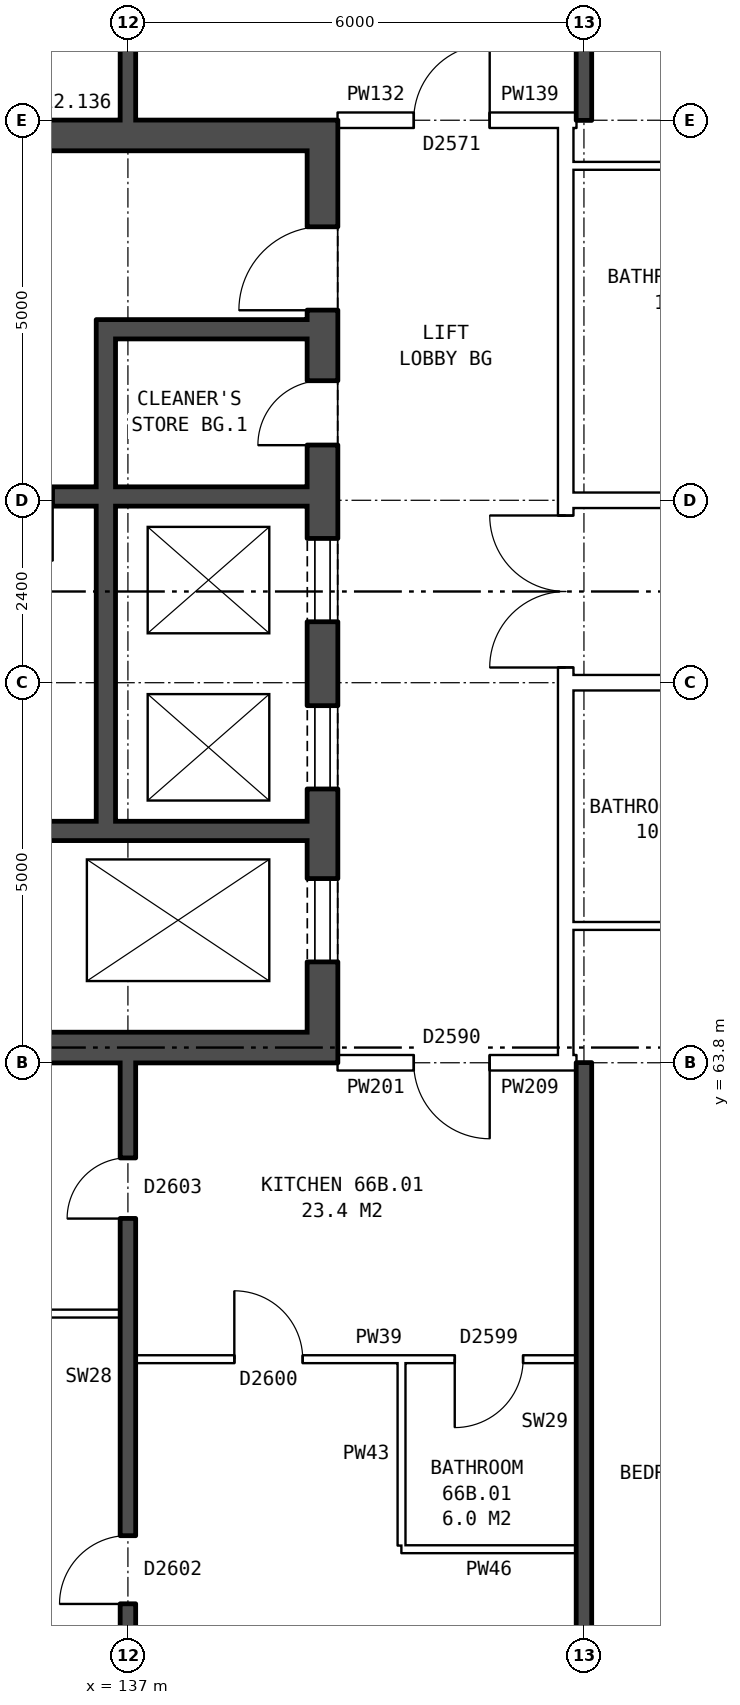
"""IFC4 building model, lengths in metres.
Left out: names, types, materials, properties, quantities, classifications, styles, units other than length and angle.
Written with IfcOpenShell. Run it as: python <this file> out.ifc"""

import sys

from ifc_helpers import new_model, si_unit, direction, frame, frame_2d, origin, place, context, subcontext, project, spatial, rectangle, extrude, element, fill, save


model = new_model("IFC4")
c1 = context("Model", 3, precision=1e-05, world=origin(), true_north=direction((0.0, 1.0)))
c2 = subcontext(c1, "Body", "Model", "MODEL_VIEW")
j1 = project(units=[si_unit("LENGTHUNIT", "METRE"), si_unit("PLANEANGLEUNIT", "RADIAN")], contexts=[c1])
p1 = place(None, origin())
s1 = spatial("IfcSite", under=j1, at=p1, CompositionType="ELEMENT")
p2 = place(p1, origin())
s2 = spatial("IfcBuilding", under=s1, at=p2, CompositionType="ELEMENT")
p3 = place(p2, frame((0.0, 0.0, 233.8)))
s3 = spatial("IfcBuildingStorey", under=s2, at=p3, CompositionType="ELEMENT", Elevation=233.8)
p4 = place(p3, frame((139.56, 63.8, 0.0), z_axis=(0.0, 0.0, 1.0), x_axis=(0.0, 1.0, 0.0)))
e1 = element("IfcWall", 1, at=p4, inside=s3, PredefinedType="SHEAR", context=c2, shape_type="SweptSolid", body=[
    extrude(rectangle(XDim=12.4, YDim=0.4, at=frame_2d((6.2, 0.0))), origin(), (0.0, 0.0, 1.0), 2.85),
])
p5 = place(p4, frame((1.325, 0.0, 0.0)))
e2 = element("IfcOpeningElement", 2, at=p5, cuts=e1, PredefinedType="OPENING", context=c2, shape_type="SweptSolid", body=[
    extrude(rectangle(XDim=1.1, YDim=2.1, at=frame_2d((0.55, 1.05))), frame((0.0, 0.21, 0.0), z_axis=(0.0, -1.0, 0.0), x_axis=(1.0, 0.0, 0.0)), (0.0, 0.0, 1.0), 0.42),
])
p6 = place(p4, frame((3.6, 0.0, 0.0)))
e3 = element("IfcOpeningElement", 3, at=p6, cuts=e1, PredefinedType="OPENING", context=c2, shape_type="SweptSolid", body=[
    extrude(rectangle(XDim=1.1, YDim=2.1, at=frame_2d((0.55, 1.05))), frame((0.0, 0.21, 0.0), z_axis=(0.0, -1.0, 0.0), x_axis=(1.0, 0.0, 0.0)), (0.0, 0.0, 1.0), 0.42),
])
p7 = place(p4, frame((5.8, 0.0, 0.0)))
e4 = element("IfcOpeningElement", 4, at=p7, cuts=e1, PredefinedType="OPENING", context=c2, shape_type="SweptSolid", body=[
    extrude(rectangle(XDim=1.1, YDim=2.1, at=frame_2d((0.55, 1.05))), frame((0.0, 0.21, 0.0), z_axis=(0.0, -1.0, 0.0), x_axis=(1.0, 0.0, 0.0)), (0.0, 0.0, 1.0), 0.42),
])
p8 = place(p4, frame((9.9, 0.0, 0.0)))
e5 = element("IfcOpeningElement", 5, at=p8, cuts=e1, PredefinedType="OPENING", context=c2, shape_type="SweptSolid", body=[
    extrude(rectangle(XDim=1.1, YDim=2.1, at=frame_2d((0.55, 1.05))), frame((0.0, 0.21, 0.0), z_axis=(0.0, -1.0, 0.0), x_axis=(1.0, 0.0, 0.0)), (0.0, 0.0, 1.0), 0.42),
])
p9 = place(p4, frame((8.125, 0.0, 0.0)))
e6 = element("IfcOpeningElement", 6, at=p9, cuts=e1, PredefinedType="OPENING", context=c2, shape_type="SweptSolid", body=[
    extrude(rectangle(XDim=0.85, YDim=2.1, at=frame_2d((0.425, 1.05))), frame((0.0, 0.21, 0.0), z_axis=(0.0, -1.0, 0.0), x_axis=(1.0, 0.0, 0.0)), (0.0, 0.0, 1.0), 0.42),
])
for number, where, z_axis, x_axis in (
    (7, (139.36, 64.0, 0.0), (0.0, 0.0, 1.0), (-1.0, 0.0, 0.0)),
    (8, (139.36, 76.0, 0.0), (0.0, 0.0, 1.0), (-1.0, 0.0, 0.0)),
):
    element("IfcWall", number, at=place(p3, frame(where, z_axis=z_axis, x_axis=x_axis)), inside=s3, PredefinedType="SHEAR", context=c2, shape_type="SweptSolid", body=[
        extrude(rectangle(XDim=7.6, YDim=0.4, at=frame_2d((3.8, 0.0))), origin(), (0.0, 0.0, 1.0), 2.85),
    ])
p10 = place(p3, frame((139.36, 66.85, 0.0), z_axis=(0.0, 0.0, 1.0), x_axis=(-1.0, 0.0, 0.0)))
e9 = element("IfcWall", 9, at=p10, inside=s3, PredefinedType="SHEAR", context=c2, shape_type="SweptSolid", body=[
    extrude(rectangle(XDim=4.775, YDim=0.25, at=frame_2d((2.388, 0.0))), origin(), (0.0, 0.0, 1.0), 2.85),
])
p11 = place(p3, frame((139.36, 71.25, 0.0), z_axis=(0.0, 0.0, 1.0), x_axis=(-1.0, 0.0, 0.0)))
e10 = element("IfcWall", 10, at=p11, inside=s3, PredefinedType="SHEAR", context=c2, shape_type="SweptSolid", body=[
    extrude(rectangle(XDim=7.6, YDim=0.25, at=frame_2d((3.8, 0.0))), origin(), (0.0, 0.0, 1.0), 2.85),
])
p12 = place(p11, frame((5.175, 0.0, 0.0)))
e11 = element("IfcOpeningElement", 11, at=p12, cuts=e10, PredefinedType="OPENING", context=c2, shape_type="SweptSolid", body=[
    extrude(rectangle(XDim=1.1, YDim=2.1, at=frame_2d((0.55, 1.05))), frame((0.0, 0.135, 0.0), z_axis=(0.0, -1.0, 0.0), x_axis=(1.0, 0.0, 0.0)), (0.0, 0.0, 1.0), 0.27),
])
p13 = place(p11, frame((3.35, 0.0, 0.0)))
e12 = element("IfcOpeningElement", 12, at=p13, cuts=e10, PredefinedType="OPENING", context=c2, shape_type="SweptSolid", body=[
    extrude(rectangle(XDim=0.85, YDim=2.1, at=frame_2d((0.425, 1.05))), frame((0.0, 0.135, 0.0), z_axis=(0.0, -1.0, 0.0), x_axis=(1.0, 0.0, 0.0)), (0.0, 0.0, 1.0), 0.27),
])
p14 = place(p3, frame((139.36, 73.45, 0.0), z_axis=(0.0, 0.0, 1.0), x_axis=(-1.0, 0.0, 0.0)))
e13 = element("IfcWall", 13, at=p14, inside=s3, PredefinedType="SHEAR", context=c2, shape_type="SweptSolid", body=[
    extrude(rectangle(XDim=2.525, YDim=0.25, at=frame_2d((1.263, 0.0))), origin(), (0.0, 0.0, 1.0), 2.85),
])
p15 = place(p3, frame((136.71, 66.975, 0.0), z_axis=(0.0, 0.0, 1.0), x_axis=(0.0, 1.0, 0.0)))
e14 = element("IfcWall", 14, at=p15, inside=s3, PredefinedType="SHEAR", context=c2, shape_type="SweptSolid", body=[
    extrude(rectangle(XDim=4.15, YDim=0.25, at=frame_2d((2.075, 0.0))), origin(), (0.0, 0.0, 1.0), 2.85),
])
p16 = place(p3, frame((136.71, 71.375, 0.0), z_axis=(0.0, 0.0, 1.0), x_axis=(0.0, 1.0, 0.0)))
e15 = element("IfcWall", 15, at=p16, inside=s3, PredefinedType="SHEAR", context=c2, shape_type="SweptSolid", body=[
    extrude(rectangle(XDim=2.2, YDim=0.25, at=frame_2d((1.1, 0.0))), origin(), (0.0, 0.0, 1.0), 2.85),
])
p17 = place(p3, frame((142.76, 63.9, 0.0), z_axis=(0.0, 0.0, 1.0), x_axis=(0.0, 1.0, 0.0)))
e16 = element("IfcWall", 16, at=p17, inside=s3, PredefinedType="PARTITIONING", context=c2, shape_type="SweptSolid", body=[
    extrude(rectangle(XDim=12.2, YDim=0.2, at=frame_2d((6.1, 0.0))), origin(), (0.0, 0.0, 1.0), 2.85),
])
p18 = place(p17, frame((5.1, 0.0, 0.0)))
e17 = element("IfcOpeningElement", 17, at=p18, cuts=e16, PredefinedType="OPENING", context=c2, shape_type="SweptSolid", body=[
    extrude(rectangle(XDim=2.0, YDim=2.1, at=frame_2d((1.0, 1.05))), frame((0.0, 0.11, 0.0), z_axis=(0.0, -1.0, 0.0), x_axis=(1.0, 0.0, 0.0)), (0.0, 0.0, 1.0), 0.22),
])
p19 = place(p3, frame((140.6, 57.4, 0.0), z_axis=(0.0, 0.0, 1.0), x_axis=(1.0, 0.0, 0.0)))
e18 = element("IfcWall", 18, at=p19, inside=s3, PredefinedType="PARTITIONING", context=c2, shape_type="SweptSolid", body=[
    extrude(rectangle(XDim=2.3, YDim=0.1, at=frame_2d((1.15, 0.0))), origin(), (0.0, 0.0, 1.0), 2.85),
])
p20 = place(p3, frame((137.1, 59.9, 0.0), z_axis=(0.0, 0.0, 1.0), x_axis=(1.0, 0.0, 0.0)))
e19 = element("IfcWall", 19, at=p20, inside=s3, PredefinedType="PARTITIONING", context=c2, shape_type="SweptSolid", body=[
    extrude(rectangle(XDim=5.8, YDim=0.1, at=frame_2d((2.9, 0.0))), origin(), (0.0, 0.0, 1.0), 2.85),
])
p21 = place(p20, frame((1.3, 0.0, 0.0)))
e20 = element("IfcOpeningElement", 20, at=p21, cuts=e19, PredefinedType="OPENING", context=c2, shape_type="SweptSolid", body=[
    extrude(rectangle(XDim=0.9, YDim=2.1, at=frame_2d((0.45, 1.05))), frame((0.0, 0.06, 0.0), z_axis=(0.0, -1.0, 0.0), x_axis=(1.0, 0.0, 0.0)), (0.0, 0.0, 1.0), 0.12),
])
p22 = place(p20, frame((4.2, 0.0, 0.0)))
e21 = element("IfcOpeningElement", 21, at=p22, cuts=e19, PredefinedType="OPENING", context=c2, shape_type="SweptSolid", body=[
    extrude(rectangle(XDim=0.9, YDim=2.1, at=frame_2d((0.45, 1.05))), frame((0.0, 0.06, 0.0), z_axis=(0.0, -1.0, 0.0), x_axis=(1.0, 0.0, 0.0)), (0.0, 0.0, 1.0), 0.12),
])
p23 = place(p3, frame((131.1, 60.5, 0.0), z_axis=(0.0, 0.0, 1.0), x_axis=(1.0, 0.0, 0.0)))
e22 = element("IfcWall", 22, at=p23, inside=s3, PredefinedType="PARTITIONING", context=c2, shape_type="SweptSolid", body=[
    extrude(rectangle(XDim=5.8, YDim=0.1, at=frame_2d((2.9, 0.0))), origin(), (0.0, 0.0, 1.0), 2.85),
])
p24 = place(p3, frame((139.76, 63.8, 0.0), z_axis=(0.0, 0.0, 1.0), x_axis=(1.0, 0.0, 0.0)))
e23 = element("IfcWall", 23, at=p24, inside=s3, PredefinedType="PARTITIONING", context=c2, shape_type="SweptSolid", body=[
    extrude(rectangle(XDim=3.0, YDim=0.2, at=frame_2d((1.5, 0.0))), origin(), (0.0, 0.0, 1.0), 2.85),
])
p25 = place(p24, frame((1.0, 0.0, 0.0)))
e24 = element("IfcOpeningElement", 24, at=p25, cuts=e23, PredefinedType="OPENING", context=c2, shape_type="SweptSolid", body=[
    extrude(rectangle(XDim=1.0, YDim=2.1, at=frame_2d((0.5, 1.05))), frame((0.0, 0.11, 0.0), z_axis=(0.0, -1.0, 0.0), x_axis=(1.0, 0.0, 0.0)), (0.0, 0.0, 1.0), 0.22),
])
p26 = place(p3, frame((142.76, 63.8, 0.0), z_axis=(0.0, 0.0, 1.0), x_axis=(1.0, 0.0, 0.0)))
e25 = element("IfcWall", 25, at=p26, inside=s3, PredefinedType="PARTITIONING", context=c2, shape_type="SweptSolid", body=[
    extrude(rectangle(XDim=0.14, YDim=0.2, at=frame_2d((0.07, 0.0))), origin(), (0.0, 0.0, 1.0), 2.85),
])
p27 = place(p3, frame((142.76, 65.6, 0.0), z_axis=(0.0, 0.0, 1.0), x_axis=(1.0, 0.0, 0.0)))
e26 = element("IfcWall", 26, at=p27, inside=s3, PredefinedType="PARTITIONING", context=c2, shape_type="SweptSolid", body=[
    extrude(rectangle(XDim=3.24, YDim=0.1, at=frame_2d((1.62, 0.0))), origin(), (0.0, 0.0, 1.0), 2.85),
])
p28 = place(p3, frame((142.76, 68.8, 0.0), z_axis=(0.0, 0.0, 1.0), x_axis=(1.0, 0.0, 0.0)))
e27 = element("IfcWall", 27, at=p28, inside=s3, PredefinedType="PARTITIONING", context=c2, shape_type="SweptSolid", body=[
    extrude(rectangle(XDim=14.48, YDim=0.2, at=frame_2d((7.24, 0.0))), origin(), (0.0, 0.0, 1.0), 2.85),
])
p29 = place(p28, frame((4.24, 0.0, 0.0)))
e28 = element("IfcOpeningElement", 28, at=p29, cuts=e27, PredefinedType="OPENING", context=c2, shape_type="SweptSolid", body=[
    extrude(rectangle(XDim=1.0, YDim=2.1, at=frame_2d((0.5, 1.05))), frame((0.0, 0.11, 0.0), z_axis=(0.0, -1.0, 0.0), x_axis=(1.0, 0.0, 0.0)), (0.0, 0.0, 1.0), 0.22),
])
p30 = place(p28, frame((10.24, 0.0, 0.0)))
e29 = element("IfcOpeningElement", 29, at=p30, cuts=e27, PredefinedType="OPENING", context=c2, shape_type="SweptSolid", body=[
    extrude(rectangle(XDim=1.0, YDim=2.1, at=frame_2d((0.5, 1.05))), frame((0.0, 0.11, 0.0), z_axis=(0.0, -1.0, 0.0), x_axis=(1.0, 0.0, 0.0)), (0.0, 0.0, 1.0), 0.22),
])
p31 = place(p3, frame((142.76, 71.2, 0.0), z_axis=(0.0, 0.0, 1.0), x_axis=(1.0, 0.0, 0.0)))
e30 = element("IfcWall", 30, at=p31, inside=s3, PredefinedType="PARTITIONING", context=c2, shape_type="SweptSolid", body=[
    extrude(rectangle(XDim=14.48, YDim=0.2, at=frame_2d((7.24, 0.0))), origin(), (0.0, 0.0, 1.0), 2.85),
])
p32 = place(p31, frame((4.24, 0.0, 0.0)))
e31 = element("IfcOpeningElement", 31, at=p32, cuts=e30, PredefinedType="OPENING", context=c2, shape_type="SweptSolid", body=[
    extrude(rectangle(XDim=1.0, YDim=2.1, at=frame_2d((0.5, 1.05))), frame((0.0, 0.11, 0.0), z_axis=(0.0, -1.0, 0.0), x_axis=(1.0, 0.0, 0.0)), (0.0, 0.0, 1.0), 0.22),
])
p33 = place(p31, frame((10.24, 0.0, 0.0)))
e32 = element("IfcOpeningElement", 32, at=p33, cuts=e30, PredefinedType="OPENING", context=c2, shape_type="SweptSolid", body=[
    extrude(rectangle(XDim=1.0, YDim=2.1, at=frame_2d((0.5, 1.05))), frame((0.0, 0.11, 0.0), z_axis=(0.0, -1.0, 0.0), x_axis=(1.0, 0.0, 0.0)), (0.0, 0.0, 1.0), 0.22),
])
p34 = place(p3, frame((142.76, 75.6, 0.0), z_axis=(0.0, 0.0, 1.0), x_axis=(1.0, 0.0, 0.0)))
e33 = element("IfcWall", 33, at=p34, inside=s3, PredefinedType="PARTITIONING", context=c2, shape_type="SweptSolid", body=[
    extrude(rectangle(XDim=3.24, YDim=0.1, at=frame_2d((1.62, 0.0))), origin(), (0.0, 0.0, 1.0), 2.85),
])
p35 = place(p3, frame((139.76, 76.2, 0.0), z_axis=(0.0, 0.0, 1.0), x_axis=(1.0, 0.0, 0.0)))
e34 = element("IfcWall", 34, at=p35, inside=s3, PredefinedType="PARTITIONING", context=c2, shape_type="SweptSolid", body=[
    extrude(rectangle(XDim=3.0, YDim=0.2, at=frame_2d((1.5, 0.0))), origin(), (0.0, 0.0, 1.0), 2.85),
])
p36 = place(p35, frame((1.0, 0.0, 0.0)))
e35 = element("IfcOpeningElement", 35, at=p36, cuts=e34, PredefinedType="OPENING", context=c2, shape_type="SweptSolid", body=[
    extrude(rectangle(XDim=1.0, YDim=2.1, at=frame_2d((0.5, 1.05))), frame((0.0, 0.11, 0.0), z_axis=(0.0, -1.0, 0.0), x_axis=(1.0, 0.0, 0.0)), (0.0, 0.0, 1.0), 0.22),
])
p37 = place(p3, frame((142.76, 76.2, 0.0), z_axis=(0.0, 0.0, 1.0), x_axis=(1.0, 0.0, 0.0)))
e36 = element("IfcWall", 36, at=p37, inside=s3, PredefinedType="PARTITIONING", context=c2, shape_type="SweptSolid", body=[
    extrude(rectangle(XDim=0.14, YDim=0.2, at=frame_2d((0.07, 0.0))), origin(), (0.0, 0.0, 1.0), 2.85),
])
p38 = place(p3, frame((137.0, 54.36, 0.0), z_axis=(0.0, 0.0, 1.0), x_axis=(0.0, 1.0, 0.0)))
e37 = element("IfcWall", 37, at=p38, inside=s3, PredefinedType="SOLIDWALL", context=c2, shape_type="SweptSolid", body=[
    extrude(rectangle(XDim=9.44, YDim=0.2, at=frame_2d((4.72, 0.0))), origin(), (0.0, 0.0, 1.0), 2.85),
])
p39 = place(p38, frame((2.32, 0.0, 0.0)))
e38 = element("IfcOpeningElement", 38, at=p39, cuts=e37, PredefinedType="OPENING", context=c2, shape_type="SweptSolid", body=[
    extrude(rectangle(XDim=0.9, YDim=2.1, at=frame_2d((0.45, 1.05))), frame((0.0, 0.11, 0.0), z_axis=(0.0, -1.0, 0.0), x_axis=(1.0, 0.0, 0.0)), (0.0, 0.0, 1.0), 0.22),
])
p40 = place(p38, frame((7.39, 0.0, 0.0)))
e39 = element("IfcOpeningElement", 39, at=p40, cuts=e37, PredefinedType="OPENING", context=c2, shape_type="SweptSolid", body=[
    extrude(rectangle(XDim=0.8, YDim=2.1, at=frame_2d((0.4, 1.05))), frame((0.0, 0.11, 0.0), z_axis=(0.0, -1.0, 0.0), x_axis=(1.0, 0.0, 0.0)), (0.0, 0.0, 1.0), 0.22),
])
p41 = place(p3, frame((137.0, 76.2, 0.0), z_axis=(0.0, 0.0, 1.0), x_axis=(0.0, 1.0, 0.0)))
e40 = element("IfcWall", 40, at=p41, inside=s3, PredefinedType="SOLIDWALL", context=c2, shape_type="SweptSolid", body=[
    extrude(rectangle(XDim=9.44, YDim=0.2, at=frame_2d((4.72, 0.0))), origin(), (0.0, 0.0, 1.0), 2.85),
])
p42 = place(p41, frame((6.22, 0.0, 0.0)))
e41 = element("IfcOpeningElement", 41, at=p42, cuts=e40, PredefinedType="OPENING", context=c2, shape_type="SweptSolid", body=[
    extrude(rectangle(XDim=0.9, YDim=2.1, at=frame_2d((0.45, 1.05))), frame((0.0, 0.11, 0.0), z_axis=(0.0, -1.0, 0.0), x_axis=(1.0, 0.0, 0.0)), (0.0, 0.0, 1.0), 0.22),
])
p43 = place(p41, frame((1.25, 0.0, 0.0)))
e42 = element("IfcOpeningElement", 42, at=p43, cuts=e40, PredefinedType="OPENING", context=c2, shape_type="SweptSolid", body=[
    extrude(rectangle(XDim=0.8, YDim=2.1, at=frame_2d((0.4, 1.05))), frame((0.0, 0.11, 0.0), z_axis=(0.0, -1.0, 0.0), x_axis=(1.0, 0.0, 0.0)), (0.0, 0.0, 1.0), 0.22),
])
p44 = place(p3, frame((140.6, 57.45, 0.0), z_axis=(0.0, 0.0, 1.0), x_axis=(0.0, 1.0, 0.0)))
e43 = element("IfcWall", 43, at=p44, inside=s3, PredefinedType="PARTITIONING", context=c2, shape_type="SweptSolid", body=[
    extrude(rectangle(XDim=2.4, YDim=0.1, at=frame_2d((1.2, 0.0))), origin(), (0.0, 0.0, 1.0), 2.85),
])
for number, where, z_axis, x_axis in (
    (44, (143.0, 54.36, 0.0), (0.0, 0.0, 1.0), (0.0, 1.0, 0.0)),
    (45, (143.0, 76.2, 0.0), (0.0, 0.0, 1.0), (0.0, 1.0, 0.0)),
):
    element("IfcWall", number, at=place(p3, frame(where, z_axis=z_axis, x_axis=x_axis)), inside=s3, PredefinedType="SOLIDWALL", context=c2, shape_type="SweptSolid", body=[
        extrude(rectangle(XDim=9.44, YDim=0.2, at=frame_2d((4.72, 0.0))), origin(), (0.0, 0.0, 1.0), 2.85),
    ])
p45 = place(p5, origin())
e46 = element("IfcDoor", 46, at=p45, inside=s3, OperationType="DOUBLE_DOOR_SLIDING", PredefinedType="DOOR", context=c2, shape_type="SweptSolid", body=[
    extrude(rectangle(XDim=1.1, YDim=2.1, at=frame_2d((0.55, 1.05))), frame((0.0, 0.185, 0.0), z_axis=(0.0, -1.0, 0.0), x_axis=(1.0, 0.0, 0.0)), (0.0, 0.0, 1.0), 0.05),
])
fill(e2, e46)
p46 = place(p6, origin())
e47 = element("IfcDoor", 47, at=p46, inside=s3, OperationType="DOUBLE_DOOR_SLIDING", PredefinedType="DOOR", context=c2, shape_type="SweptSolid", body=[
    extrude(rectangle(XDim=1.1, YDim=2.1, at=frame_2d((0.55, 1.05))), frame((0.0, 0.185, 0.0), z_axis=(0.0, -1.0, 0.0), x_axis=(1.0, 0.0, 0.0)), (0.0, 0.0, 1.0), 0.05),
])
fill(e3, e47)
p47 = place(p7, origin())
e48 = element("IfcDoor", 48, at=p47, inside=s3, OperationType="DOUBLE_DOOR_SLIDING", PredefinedType="DOOR", context=c2, shape_type="SweptSolid", body=[
    extrude(rectangle(XDim=1.1, YDim=2.1, at=frame_2d((0.55, 1.05))), frame((0.0, 0.185, 0.0), z_axis=(0.0, -1.0, 0.0), x_axis=(1.0, 0.0, 0.0)), (0.0, 0.0, 1.0), 0.05),
])
fill(e4, e48)
p48 = place(p8, origin())
e49 = element("IfcDoor", 49, at=p48, inside=s3, OperationType="SINGLE_SWING_LEFT", PredefinedType="DOOR", context=c2, shape_type="SweptSolid", body=[
    extrude(rectangle(XDim=1.1, YDim=2.1, at=frame_2d((0.55, 1.05))), frame((0.0, 0.185, 0.0), z_axis=(0.0, -1.0, 0.0), x_axis=(1.0, 0.0, 0.0)), (0.0, 0.0, 1.0), 0.05),
])
fill(e5, e49)
p49 = place(p9, origin())
e50 = element("IfcDoor", 50, at=p49, inside=s3, OperationType="SINGLE_SWING_LEFT", PredefinedType="DOOR", context=c2, shape_type="SweptSolid", body=[
    extrude(rectangle(XDim=0.85, YDim=2.1, at=frame_2d((0.425, 1.05))), frame((0.0, 0.185, 0.0), z_axis=(0.0, -1.0, 0.0), x_axis=(1.0, 0.0, 0.0)), (0.0, 0.0, 1.0), 0.05),
])
fill(e6, e50)
p50 = place(p13, origin())
e51 = element("IfcDoor", 51, at=p50, inside=s3, OperationType="SINGLE_SWING_LEFT", PredefinedType="DOOR", context=c2, shape_type="SweptSolid", body=[
    extrude(rectangle(XDim=0.85, YDim=2.1, at=frame_2d((0.425, 1.05))), frame((0.0, 0.025, 0.0), z_axis=(0.0, -1.0, 0.0), x_axis=(1.0, 0.0, 0.0)), (0.0, 0.0, 1.0), 0.05),
])
fill(e12, e51)
p51 = place(p18, origin())
e52 = element("IfcDoor", 52, at=p51, inside=s3, OperationType="DOUBLE_DOOR_SINGLE_SWING", PredefinedType="DOOR", context=c2, shape_type="SweptSolid", body=[
    extrude(rectangle(XDim=2.0, YDim=2.1, at=frame_2d((1.0, 1.05))), frame((0.0, 0.025, 0.0), z_axis=(0.0, -1.0, 0.0), x_axis=(1.0, 0.0, 0.0)), (0.0, 0.0, 1.0), 0.05),
])
fill(e17, e52)
p52 = place(p39, origin())
e53 = element("IfcDoor", 53, at=p52, inside=s3, OperationType="SINGLE_SWING_LEFT", PredefinedType="DOOR", context=c2, shape_type="SweptSolid", body=[
    extrude(rectangle(XDim=0.9, YDim=2.1, at=frame_2d((0.45, 1.05))), frame((0.0, 0.025, 0.0), z_axis=(0.0, -1.0, 0.0), x_axis=(1.0, 0.0, 0.0)), (0.0, 0.0, 1.0), 0.05),
])
fill(e38, e53)
p53 = place(p25, frame((1.0, 0.0, 0.0), z_axis=(0.0, 0.0, 1.0), x_axis=(-1.0, 0.0, 0.0)))
e54 = element("IfcDoor", 54, at=p53, inside=s3, OperationType="SINGLE_SWING_LEFT", PredefinedType="DOOR", context=c2, shape_type="SweptSolid", body=[
    extrude(rectangle(XDim=1.0, YDim=2.1, at=frame_2d((0.5, 1.05))), frame((0.0, 0.025, 0.0), z_axis=(0.0, -1.0, 0.0), x_axis=(1.0, 0.0, 0.0)), (0.0, 0.0, 1.0), 0.05),
])
fill(e24, e54)
p54 = place(p21, origin())
e55 = element("IfcDoor", 55, at=p54, inside=s3, OperationType="SINGLE_SWING_LEFT", PredefinedType="DOOR", context=c2, shape_type="SweptSolid", body=[
    extrude(rectangle(XDim=0.9, YDim=2.1, at=frame_2d((0.45, 1.05))), frame((0.0, 0.025, 0.0), z_axis=(0.0, -1.0, 0.0), x_axis=(1.0, 0.0, 0.0)), (0.0, 0.0, 1.0), 0.05),
])
fill(e20, e55)
p55 = place(p40, origin())
e56 = element("IfcDoor", 56, at=p55, inside=s3, OperationType="SINGLE_SWING_LEFT", PredefinedType="DOOR", context=c2, shape_type="SweptSolid", body=[
    extrude(rectangle(XDim=0.8, YDim=2.1, at=frame_2d((0.4, 1.05))), frame((0.0, 0.025, 0.0), z_axis=(0.0, -1.0, 0.0), x_axis=(1.0, 0.0, 0.0)), (0.0, 0.0, 1.0), 0.05),
])
fill(e39, e56)
p56 = place(p22, frame((0.9, 0.0, 0.0), z_axis=(0.0, 0.0, 1.0), x_axis=(-1.0, 0.0, 0.0)))
e57 = element("IfcDoor", 57, at=p56, inside=s3, OperationType="SINGLE_SWING_RIGHT", PredefinedType="DOOR", context=c2, shape_type="SweptSolid", body=[
    extrude(rectangle(XDim=0.9, YDim=2.1, at=frame_2d((0.45, 1.05))), frame((0.0, 0.025, 0.0), z_axis=(0.0, -1.0, 0.0), x_axis=(1.0, 0.0, 0.0)), (0.0, 0.0, 1.0), 0.05),
])
fill(e21, e57)
p57 = place(p36, origin())
e58 = element("IfcDoor", 58, at=p57, inside=s3, OperationType="SINGLE_SWING_RIGHT", PredefinedType="DOOR", context=c2, shape_type="SweptSolid", body=[
    extrude(rectangle(XDim=1.0, YDim=2.1, at=frame_2d((0.5, 1.05))), frame((0.0, 0.025, 0.0), z_axis=(0.0, -1.0, 0.0), x_axis=(1.0, 0.0, 0.0)), (0.0, 0.0, 1.0), 0.05),
])
fill(e35, e58)
save(model, sys.argv[1])
